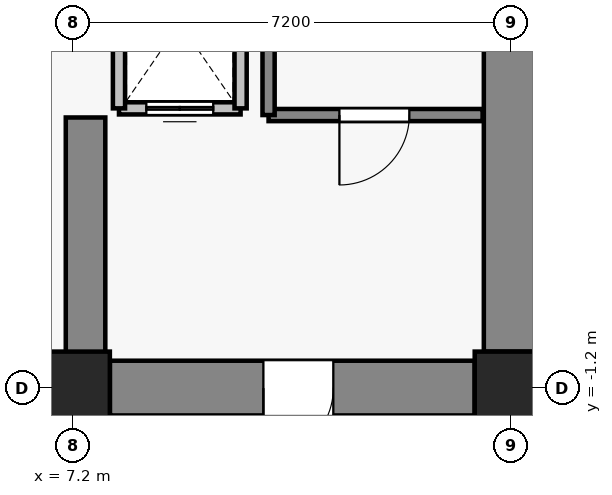
"""IFC4 building model, lengths in metres.
Left out: names, types, materials, properties, quantities, classifications, styles, units other than length and angle.
Written with IfcOpenShell. Run it as: python <this file> out.ifc"""

import sys

from ifc_helpers import new_model, si_unit, direction, frame, frame_2d, origin, origin_2d, place, context, subcontext, project, spatial, rectangle, extrude, source, transform, mapped, element, fill, save


model = new_model("IFC4")
c1 = context("Model", 3, precision=1e-05, world=origin(), true_north=direction((0.0, 1.0)))
c2 = subcontext(c1, "Body", "Model", "MODEL_VIEW")
j1 = project(units=[si_unit("LENGTHUNIT", "METRE"), si_unit("PLANEANGLEUNIT", "RADIAN")], contexts=[c1])
p1 = place(None, origin())
s1 = spatial("IfcSite", under=j1, at=p1, CompositionType="ELEMENT")
p2 = place(p1, origin())
s2 = spatial("IfcBuilding", under=s1, at=p2, CompositionType="ELEMENT")
p3 = place(p2, frame((0.0, 0.0, 43.9)))
s3 = spatial("IfcBuildingStorey", under=s2, at=p3, CompositionType="ELEMENT", Elevation=43.9)
for number, where, z_axis, x_axis in (
    (1, (7.2, -1.2, 0.0), (0.0, 0.0, 1.0), (1.0, 0.0, 0.0)),
    (2, (14.4, -1.2, 0.0), (0.0, 0.0, 1.0), (1.0, 0.0, 0.0)),
):
    element("IfcColumn", number, at=place(p3, frame(where, z_axis=z_axis, x_axis=x_axis)), inside=s3, PredefinedType="COLUMN", context=c2, shape_type="SweptSolid", body=[
        extrude(rectangle(XDim=1.2, YDim=1.2, at=origin_2d()), origin(), (0.0, 0.0, 1.0), 3.3),
    ])
p4 = place(p3, frame((14.4, -0.6, 0.0), z_axis=(0.0, 0.0, 1.0), x_axis=(0.0, 1.0, 0.0)))
e3 = element("IfcWall", 3, at=p4, inside=s3, PredefinedType="SHEAR", context=c2, shape_type="SweptSolid", body=[
    extrude(rectangle(XDim=6.6, YDim=0.9, at=frame_2d((3.3, 0.0))), origin(), (0.0, 0.0, 1.0), 3.075),
])
p5 = place(p3, frame((13.8, -1.2, 0.0), z_axis=(0.0, 0.0, 1.0), x_axis=(-1.0, 0.0, 0.0)))
e4 = element("IfcWall", 4, at=p5, inside=s3, PredefinedType="SHEAR", context=c2, shape_type="SweptSolid", body=[
    extrude(rectangle(XDim=6.0, YDim=0.9, at=frame_2d((3.0, 0.0))), origin(), (0.0, 0.0, 1.0), 3.075),
])
p6 = place(p5, frame((2.325, 0.0, 0.0)))
e5 = element("IfcOpeningElement", 5, at=p6, cuts=e4, PredefinedType="OPENING", context=c2, shape_type="SweptSolid", body=[
    extrude(rectangle(XDim=1.15, YDim=2.15, at=frame_2d((0.575, 1.075))), frame((0.0, 0.46, 0.0), z_axis=(0.0, -1.0, 0.0), x_axis=(1.0, 0.0, 0.0)), (0.0, 0.0, 1.0), 0.92),
])
p7 = place(p3, frame((7.4, -0.75, 0.0), z_axis=(0.0, 0.0, 1.0), x_axis=(0.0, 1.0, 0.0)))
e6 = element("IfcWall", 6, at=p7, inside=s3, PredefinedType="SHEAR", context=c2, shape_type="SweptSolid", body=[
    extrude(rectangle(XDim=4.0, YDim=0.65, at=frame_2d((2.0, 0.0))), origin(), (0.0, 0.0, 1.0), 3.075),
])
p8 = place(p3, frame((9.95, 3.4, 0.0), z_axis=(0.0, 0.0, 1.0), x_axis=(-1.0, 0.0, 0.0)))
e7 = element("IfcWall", 7, at=p8, inside=s3, PredefinedType="SOLIDWALL", context=c2, shape_type="SweptSolid", body=[
    extrude(rectangle(XDim=2.0, YDim=0.2, at=frame_2d((1.0, 0.0))), origin(), (0.0, 0.0, 1.0), 3.075),
])
p9 = place(p8, frame((0.45, 0.0, 0.0)))
e8 = element("IfcOpeningElement", 8, at=p9, cuts=e7, PredefinedType="OPENING", context=c2, shape_type="SweptSolid", body=[
    extrude(rectangle(XDim=1.1, YDim=2.2, at=frame_2d((0.55, 1.1))), frame((0.0, 0.11, 0.0), z_axis=(0.0, -1.0, 0.0), x_axis=(1.0, 0.0, 0.0)), (0.0, 0.0, 1.0), 0.22),
])
for number, where, z_axis, x_axis in (
    (9, (7.95, 3.4, 0.0), (0.0, 0.0, 1.0), (0.0, 1.0, 0.0)),
    (10, (9.95, 6.2, 0.0), (0.0, 0.0, 1.0), (0.0, -1.0, 0.0)),
):
    element("IfcWall", number, at=place(p3, frame(where, z_axis=z_axis, x_axis=x_axis)), inside=s3, PredefinedType="SOLIDWALL", context=c2, shape_type="SweptSolid", body=[
        extrude(rectangle(XDim=2.8, YDim=0.2, at=frame_2d((1.4, 0.0))), origin(), (0.0, 0.0, 1.0), 3.075),
    ])
p10 = place(p3, frame((13.93, 3.29, 0.0), z_axis=(0.0, 0.0, 1.0), x_axis=(-1.0, 0.0, 0.0)))
e11 = element("IfcWall", 11, at=p10, inside=s3, PredefinedType="SOLIDWALL", context=c2, shape_type="SweptSolid", body=[
    extrude(rectangle(XDim=3.52, YDim=0.2, at=frame_2d((1.76, 0.0))), origin(), (0.0, 0.0, 1.0), 3.075),
])
p11 = place(p10, frame((1.205, 0.0, 0.0)))
e12 = element("IfcOpeningElement", 12, at=p11, cuts=e11, PredefinedType="OPENING", context=c2, shape_type="SweptSolid", body=[
    extrude(rectangle(XDim=1.15, YDim=2.15, at=frame_2d((0.575, 1.075))), frame((0.0, 0.11, 0.0), z_axis=(0.0, -1.0, 0.0), x_axis=(1.0, 0.0, 0.0)), (0.0, 0.0, 1.0), 0.22),
])
p12 = place(p3, frame((10.41, 3.29, 0.0), z_axis=(0.0, 0.0, 1.0), x_axis=(0.0, 1.0, 0.0)))
e13 = element("IfcWall", 13, at=p12, inside=s3, PredefinedType="SOLIDWALL", context=c2, shape_type="SweptSolid", body=[
    extrude(rectangle(XDim=8.84, YDim=0.2, at=frame_2d((4.42, 0.0))), origin(), (0.0, 0.0, 1.0), 3.075),
])
m1 = source(origin(), c2, "Body", "SweptSolid", [
    extrude(rectangle(XDim=1.1, YDim=2.2, at=frame_2d((0.55, 1.1))), frame((0.0, 0.025, 0.0), z_axis=(0.0, -1.0, 0.0), x_axis=(1.0, 0.0, 0.0)), (0.0, 0.0, 1.0), 0.05),
])
p13 = place(p9, origin())
e14 = element("IfcDoor", 14, at=p13, inside=s3, OperationType="DOUBLE_DOOR_SLIDING", PredefinedType="DOOR", context=c2, shape_type="MappedRepresentation", body=[
    mapped(m1, transform((0.0, 0.0, 0.0), x_axis=(1.0, 0.0, 0.0), y_axis=(0.0, 1.0, 0.0), z_axis=(0.0, 0.0, 1.0), scale=1.0)),
])
fill(e8, e14)
m2 = source(origin(), c2, "Body", "SweptSolid", [
    extrude(rectangle(XDim=1.15, YDim=2.15, at=frame_2d((0.575, 1.075))), frame((0.0, 0.025, 0.0), z_axis=(0.0, -1.0, 0.0), x_axis=(1.0, 0.0, 0.0)), (0.0, 0.0, 1.0), 0.05),
])
p14 = place(p11, origin())
e15 = element("IfcDoor", 15, at=p14, inside=s3, OperationType="SINGLE_SWING_RIGHT", PredefinedType="DOOR", context=c2, shape_type="MappedRepresentation", body=[
    mapped(m2, transform((0.0, 0.0, 0.0), x_axis=(1.0, 0.0, 0.0), y_axis=(0.0, 1.0, 0.0), z_axis=(0.0, 0.0, 1.0), scale=1.0)),
])
fill(e12, e15)
p15 = place(p6, origin())
e16 = element("IfcDoor", 16, at=p15, inside=s3, OperationType="SINGLE_SWING_RIGHT", PredefinedType="DOOR", context=c2, shape_type="MappedRepresentation", body=[
    mapped(m2, transform((0.0, 0.0, 0.0), x_axis=(1.0, 0.0, 0.0), y_axis=(0.0, 1.0, 0.0), z_axis=(0.0, 0.0, 1.0), scale=1.0)),
])
fill(e5, e16)
save(model, sys.argv[1])
